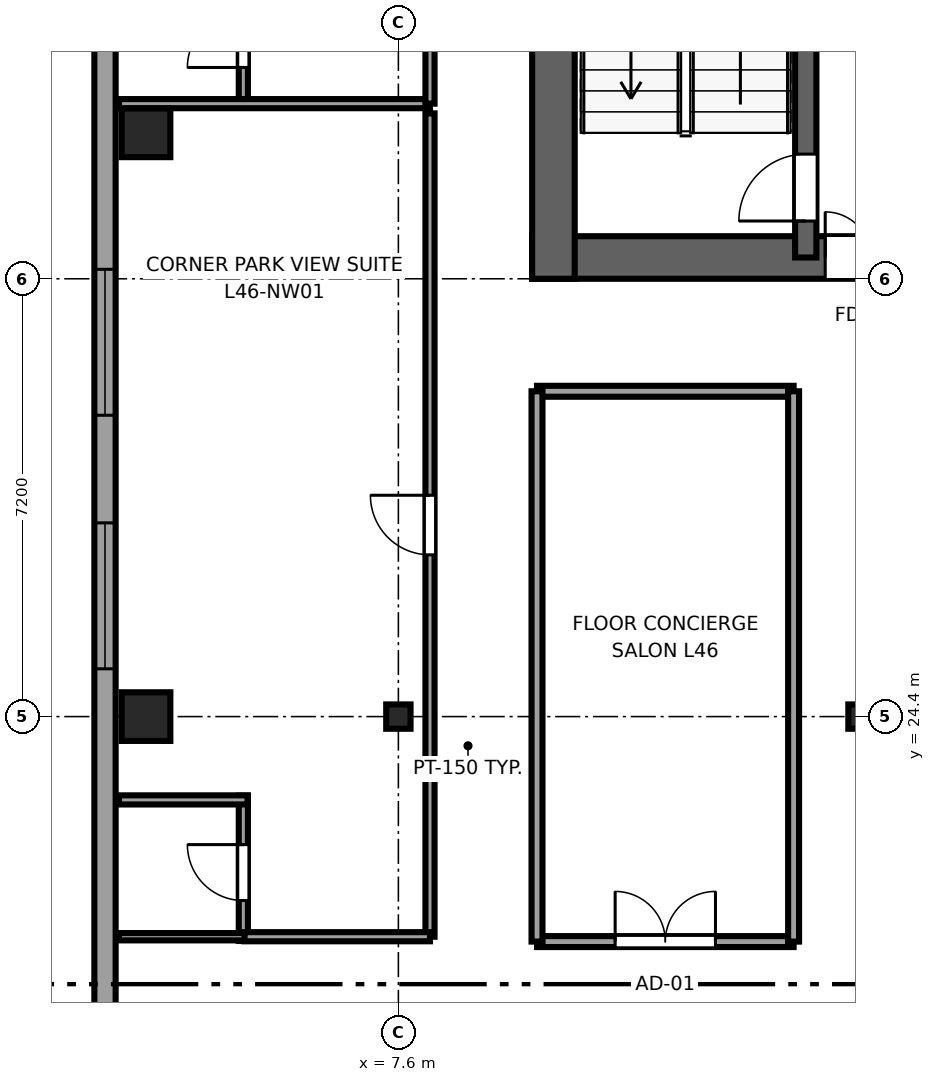
"""IFC4 building model, lengths in metres.
Left out: names, types, materials, properties, quantities, classifications, styles, units other than length and angle.
Written with IfcOpenShell. Run it as: python <this file> out.ifc"""

import sys

from ifc_helpers import new_model, si_unit, direction, frame, frame_2d, origin, origin_2d, place, context, subcontext, project, spatial, rectangle, i_section, extrude, source, transform, mapped, element, fill, save


model = new_model("IFC4")
c1 = context("Model", 3, precision=1e-05, world=origin(), true_north=direction((0.0, 1.0)))
c2 = subcontext(c1, "Body", "Model", "MODEL_VIEW")
j1 = project(units=[si_unit("LENGTHUNIT", "METRE"), si_unit("PLANEANGLEUNIT", "RADIAN")], contexts=[c1])
p1 = place(None, origin())
s1 = spatial("IfcSite", under=j1, at=p1, CompositionType="ELEMENT")
p2 = place(p1, origin())
s2 = spatial("IfcBuilding", under=s1, at=p2, CompositionType="ELEMENT")
p3 = place(p2, frame((0.0, 0.0, 175.45)))
s3 = spatial("IfcBuildingStorey", under=s2, at=p3, CompositionType="ELEMENT", Elevation=175.45)
p4 = place(p3, frame((9.8, 31.95, 0.0), z_axis=(0.0, 0.0, 1.0), x_axis=(1.0, 0.0, 0.0)))
e1 = element("IfcWall", 1, at=p4, inside=s3, PredefinedType="SHEAR", context=c2, shape_type="SweptSolid", body=[
    extrude(rectangle(XDim=26.4, YDim=0.7, at=frame_2d((13.2, 0.0))), origin(), (0.0, 0.0, 1.0), 3.55),
])
p5 = place(p4, frame((6.32, 0.0, 0.0), z_axis=(0.0, 0.0, 1.0), x_axis=(-1.0, 0.0, 0.0)))
e2 = element("IfcOpeningElement", 2, at=p5, cuts=e1, PredefinedType="OPENING", context=c2, shape_type="SweptSolid", body=[
    extrude(rectangle(XDim=1.5, YDim=2.04, at=frame_2d((0.75, 1.02))), frame((0.0, 0.36, 0.0), z_axis=(0.0, -1.0, 0.0), x_axis=(1.0, 0.0, 0.0)), (0.0, 0.0, 1.0), 0.72),
])
p6 = place(p4, frame((13.95, 0.0, 0.0), z_axis=(0.0, 0.0, 1.0), x_axis=(-1.0, 0.0, 0.0)))
e3 = element("IfcOpeningElement", 3, at=p6, cuts=e1, PredefinedType="OPENING", context=c2, shape_type="SweptSolid", body=[
    extrude(rectangle(XDim=1.5, YDim=2.04, at=frame_2d((0.75, 1.02))), frame((0.0, 0.36, 0.0), z_axis=(0.0, -1.0, 0.0), x_axis=(1.0, 0.0, 0.0)), (0.0, 0.0, 1.0), 0.72),
])
p7 = place(p4, frame((20.25, 0.0, 0.0), z_axis=(0.0, 0.0, 1.0), x_axis=(-1.0, 0.0, 0.0)))
e4 = element("IfcOpeningElement", 4, at=p7, cuts=e1, PredefinedType="OPENING", context=c2, shape_type="SweptSolid", body=[
    extrude(rectangle(XDim=1.5, YDim=2.04, at=frame_2d((0.75, 1.02))), frame((0.0, 0.36, 0.0), z_axis=(0.0, -1.0, 0.0), x_axis=(1.0, 0.0, 0.0)), (0.0, 0.0, 1.0), 0.72),
])
p8 = place(p4, frame((8.37, 0.0, 0.0), z_axis=(0.0, 0.0, 1.0), x_axis=(-1.0, 0.0, 0.0)))
e5 = element("IfcOpeningElement", 5, at=p8, cuts=e1, PredefinedType="OPENING", context=c2, shape_type="SweptSolid", body=[
    extrude(rectangle(XDim=0.82, YDim=2.01, at=frame_2d((0.41, 1.005))), frame((0.0, 0.36, 0.0), z_axis=(0.0, -1.0, 0.0), x_axis=(1.0, 0.0, 0.0)), (0.0, 0.0, 1.0), 0.72),
])
p9 = place(p3, frame((10.15, 31.6, 0.0), z_axis=(0.0, 0.0, 1.0), x_axis=(0.0, 1.0, 0.0)))
e6 = element("IfcWall", 6, at=p9, inside=s3, PredefinedType="SHEAR", context=c2, shape_type="SweptSolid", body=[
    extrude(rectangle(XDim=13.6, YDim=0.7, at=frame_2d((6.8, 0.0))), origin(), (0.0, 0.0, 1.0), 3.55),
])
p10 = place(p3, frame((14.3, 31.95, 0.0), z_axis=(0.0, 0.0, 1.0), x_axis=(0.0, 1.0, 0.0)))
e7 = element("IfcWall", 7, at=p10, inside=s3, PredefinedType="SHEAR", context=c2, shape_type="SweptSolid", body=[
    extrude(rectangle(XDim=12.9, YDim=0.35, at=frame_2d((6.45, 0.0))), origin(), (0.0, 0.0, 1.0), 3.55),
])
p11 = place(p10, frame((0.6, 0.0, 0.0)))
e8 = element("IfcOpeningElement", 8, at=p11, cuts=e7, PredefinedType="OPENING", context=c2, shape_type="SweptSolid", body=[
    extrude(rectangle(XDim=1.1, YDim=2.12, at=frame_2d((0.55, 1.06))), frame((0.0, 0.185, 0.0), z_axis=(0.0, -1.0, 0.0), x_axis=(1.0, 0.0, 0.0)), (0.0, 0.0, 1.0), 0.37),
])
m1 = source(origin(), c2, "Body", "SweptSolid", [
    extrude(rectangle(XDim=0.8, YDim=0.8, at=origin_2d()), origin(), (0.0, 0.0, 1.0), 3.55),
])
p12 = place(p3, frame((3.45, 24.4, 0.0), z_axis=(0.0, 0.0, 1.0), x_axis=(1.0, 0.0, 0.0)))
e9 = element("IfcColumn", 9, at=p12, inside=s3, PredefinedType="COLUMN", context=c2, shape_type="MappedRepresentation", body=[
    mapped(m1, transform((0.0, 0.0, 0.0), x_axis=(1.0, 0.0, 0.0), y_axis=(0.0, 1.0, 0.0), z_axis=(0.0, 0.0, 1.0), scale=1.0)),
])
m2 = source(origin(), c2, "Body", "SweptSolid", [
    extrude(i_section(OverallWidth=0.4, OverallDepth=0.4, WebThickness=0.02, FlangeThickness=0.035, at=origin_2d()), origin(), (0.0, 0.0, 1.0), 3.55),
])
for number, where, z_axis, x_axis in (
    (10, (7.6, 24.4, 0.0), (0.0, 0.0, 1.0), (1.0, 0.0, 0.0)),
    (11, (15.2, 24.4, 0.0), (0.0, 0.0, 1.0), (1.0, 0.0, 0.0)),
):
    element("IfcColumn", number, at=place(p3, frame(where, z_axis=z_axis, x_axis=x_axis)), inside=s3, PredefinedType="COLUMN", context=c2, shape_type="MappedRepresentation", body=[
        mapped(m2, transform((0.0, 0.0, 0.0), x_axis=(1.0, 0.0, 0.0), y_axis=(0.0, 1.0, 0.0), z_axis=(0.0, 0.0, 1.0), scale=1.0)),
    ])
p13 = place(p3, frame((3.45, 34.0, 0.0), z_axis=(0.0, 0.0, 1.0), x_axis=(1.0, 0.0, 0.0)))
e12 = element("IfcColumn", 12, at=p13, inside=s3, PredefinedType="COLUMN", context=c2, shape_type="MappedRepresentation", body=[
    mapped(m1, transform((0.0, 0.0, 0.0), x_axis=(1.0, 0.0, 0.0), y_axis=(0.0, 1.0, 0.0), z_axis=(0.0, 0.0, 1.0), scale=1.0)),
])
p14 = place(p3, frame((2.775, 41.583, 0.0), z_axis=(0.0, 0.0, 1.0), x_axis=(0.0, -1.0, 0.0)))
e13 = element("IfcWall", 13, at=p14, inside=s3, PredefinedType="SOLIDWALL", context=c2, shape_type="SweptSolid", body=[
    extrude(rectangle(XDim=34.566, YDim=0.35, at=frame_2d((17.283, 0.0))), origin(), (0.0, 0.0, 1.0), 3.37),
])
p15 = place(p14, frame((1.485, 0.0, 0.68)))
e14 = element("IfcOpeningElement", 14, at=p15, cuts=e13, PredefinedType="OPENING", context=c2, shape_type="SweptSolid", body=[
    extrude(rectangle(XDim=2.4, YDim=1.9, at=frame_2d((1.2, 0.95))), frame((0.0, 0.185, 0.0), z_axis=(0.0, -1.0, 0.0), x_axis=(1.0, 0.0, 0.0)), (0.0, 0.0, 1.0), 0.37),
])
p16 = place(p14, frame((9.827, 0.0, 0.68)))
e15 = element("IfcOpeningElement", 15, at=p16, cuts=e13, PredefinedType="OPENING", context=c2, shape_type="SweptSolid", body=[
    extrude(rectangle(XDim=2.4, YDim=1.9, at=frame_2d((1.2, 0.95))), frame((0.0, 0.185, 0.0), z_axis=(0.0, -1.0, 0.0), x_axis=(1.0, 0.0, 0.0)), (0.0, 0.0, 1.0), 0.37),
])
p17 = place(p14, frame((13.997, 0.0, 0.68)))
e16 = element("IfcOpeningElement", 16, at=p17, cuts=e13, PredefinedType="OPENING", context=c2, shape_type="SweptSolid", body=[
    extrude(rectangle(XDim=2.4, YDim=1.9, at=frame_2d((1.2, 0.95))), frame((0.0, 0.185, 0.0), z_axis=(0.0, -1.0, 0.0), x_axis=(1.0, 0.0, 0.0)), (0.0, 0.0, 1.0), 0.37),
])
p18 = place(p14, frame((30.13, 0.0, 0.68)))
e17 = element("IfcOpeningElement", 17, at=p18, cuts=e13, PredefinedType="OPENING", context=c2, shape_type="SweptSolid", body=[
    extrude(rectangle(XDim=2.4, YDim=1.9, at=frame_2d((1.2, 0.95))), frame((0.0, 0.185, 0.0), z_axis=(0.0, -1.0, 0.0), x_axis=(1.0, 0.0, 0.0)), (0.0, 0.0, 1.0), 0.37),
])
p19 = place(p14, frame((24.983, 0.0, 0.62)))
e18 = element("IfcOpeningElement", 18, at=p19, cuts=e13, PredefinedType="OPENING", context=c2, shape_type="SweptSolid", body=[
    extrude(rectangle(XDim=1.5, YDim=1.55, at=frame_2d((0.75, 0.775))), frame((0.0, 0.185, 0.0), z_axis=(0.0, -1.0, 0.0), x_axis=(1.0, 0.0, 0.0)), (0.0, 0.0, 1.0), 0.37),
])
p20 = place(p3, frame((5.05, 20.71, 0.0), z_axis=(0.0, 0.0, 1.0), x_axis=(0.0, 1.0, 0.0)))
e19 = element("IfcWall", 19, at=p20, inside=s3, PredefinedType="PARTITIONING", context=c2, shape_type="SweptSolid", body=[
    extrude(rectangle(XDim=2.39, YDim=0.15, at=frame_2d((1.195, 0.0))), origin(), (0.0, 0.0, 1.0), 3.37),
])
p21 = place(p20, frame((0.665, 0.0, 0.0)))
e20 = element("IfcOpeningElement", 20, at=p21, cuts=e19, PredefinedType="OPENING", context=c2, shape_type="SweptSolid", body=[
    extrude(rectangle(XDim=0.92, YDim=2.01, at=frame_2d((0.46, 1.005))), frame((0.0, 0.085, 0.0), z_axis=(0.0, -1.0, 0.0), x_axis=(1.0, 0.0, 0.0)), (0.0, 0.0, 1.0), 0.17),
])
p22 = place(p3, frame((3.005, 20.78, 0.0), z_axis=(0.0, 0.0, 1.0), x_axis=(1.0, 0.0, 0.0)))
e21 = element("IfcWall", 21, at=p22, inside=s3, PredefinedType="PLUMBINGWALL", context=c2, shape_type="SweptSolid", body=[
    extrude(rectangle(XDim=2.115, YDim=0.12, at=frame_2d((1.058, 0.0))), origin(), (0.0, 0.0, 1.0), 3.37),
])
p23 = place(p3, frame((3.005, 23.03, 0.0), z_axis=(0.0, 0.0, 1.0), x_axis=(1.0, 0.0, 0.0)))
e22 = element("IfcWall", 22, at=p23, inside=s3, PredefinedType="PARTITIONING", context=c2, shape_type="SweptSolid", body=[
    extrude(rectangle(XDim=2.115, YDim=0.15, at=frame_2d((1.058, 0.0))), origin(), (0.0, 0.0, 1.0), 3.37),
])
p24 = place(p3, frame((5.05, 34.41, 0.0), z_axis=(0.0, 0.0, 1.0), x_axis=(0.0, 1.0, 0.0)))
e23 = element("IfcWall", 23, at=p24, inside=s3, PredefinedType="PARTITIONING", context=c2, shape_type="SweptSolid", body=[
    extrude(rectangle(XDim=2.39, YDim=0.15, at=frame_2d((1.195, 0.0))), origin(), (0.0, 0.0, 1.0), 3.37),
])
p25 = place(p24, frame((0.665, 0.0, 0.0)))
e24 = element("IfcOpeningElement", 24, at=p25, cuts=e23, PredefinedType="OPENING", context=c2, shape_type="SweptSolid", body=[
    extrude(rectangle(XDim=0.92, YDim=2.01, at=frame_2d((0.46, 1.005))), frame((0.0, 0.085, 0.0), z_axis=(0.0, -1.0, 0.0), x_axis=(1.0, 0.0, 0.0)), (0.0, 0.0, 1.0), 0.17),
])
p26 = place(p3, frame((3.005, 34.48, 0.0), z_axis=(0.0, 0.0, 1.0), x_axis=(1.0, 0.0, 0.0)))
e25 = element("IfcWall", 25, at=p26, inside=s3, PredefinedType="PARTITIONING", context=c2, shape_type="SweptSolid", body=[
    extrude(rectangle(XDim=5.115, YDim=0.15, at=frame_2d((2.558, 0.0))), origin(), (0.0, 0.0, 1.0), 3.37),
])
p27 = place(p3, frame((8.12, 20.78, 0.0), z_axis=(0.0, 0.0, 1.0), x_axis=(0.0, 1.0, 0.0)))
e26 = element("IfcWall", 26, at=p27, inside=s3, PredefinedType="PARTITIONING", context=c2, shape_type="SweptSolid", body=[
    extrude(rectangle(XDim=13.54, YDim=0.15, at=frame_2d((6.77, 0.0))), origin(), (0.0, 0.0, 1.0), 3.37),
])
p28 = place(p27, frame((6.28, 0.0, 0.0)))
e27 = element("IfcOpeningElement", 27, at=p28, cuts=e26, PredefinedType="OPENING", context=c2, shape_type="SweptSolid", body=[
    extrude(rectangle(XDim=0.98, YDim=2.12, at=frame_2d((0.49, 1.06))), frame((0.0, 0.085, 0.0), z_axis=(0.0, -1.0, 0.0), x_axis=(1.0, 0.0, 0.0)), (0.0, 0.0, 1.0), 0.17),
])
p29 = place(p3, frame((5.07, 20.78, 0.0), z_axis=(0.0, 0.0, 1.0), x_axis=(1.0, 0.0, 0.0)))
e28 = element("IfcWall", 28, at=p29, inside=s3, PredefinedType="PARTITIONING", context=c2, shape_type="SweptSolid", body=[
    extrude(rectangle(XDim=3.05, YDim=0.15, at=frame_2d((1.525, 0.0))), origin(), (0.0, 0.0, 1.0), 3.37),
])
p30 = place(p3, frame((8.12, 34.48, 0.0), z_axis=(0.0, 0.0, 1.0), x_axis=(0.0, 1.0, 0.0)))
e29 = element("IfcWall", 29, at=p30, inside=s3, PredefinedType="PARTITIONING", context=c2, shape_type="SweptSolid", body=[
    extrude(rectangle(XDim=11.115, YDim=0.15, at=frame_2d((5.558, 0.0))), origin(), (0.0, 0.0, 1.0), 3.37),
])
p31 = place(p30, frame((4.32, 0.0, 0.0)))
e30 = element("IfcOpeningElement", 30, at=p31, cuts=e29, PredefinedType="OPENING", context=c2, shape_type="SweptSolid", body=[
    extrude(rectangle(XDim=0.98, YDim=2.12, at=frame_2d((0.49, 1.06))), frame((0.0, 0.085, 0.0), z_axis=(0.0, -1.0, 0.0), x_axis=(1.0, 0.0, 0.0)), (0.0, 0.0, 1.0), 0.17),
])
p32 = place(p3, frame((9.88, 20.7, 0.0), z_axis=(0.0, 0.0, 1.0), x_axis=(1.0, 0.0, 0.0)))
e31 = element("IfcWall", 31, at=p32, inside=s3, PredefinedType="PARTITIONING", context=c2, shape_type="SweptSolid", body=[
    extrude(rectangle(XDim=4.22, YDim=0.18, at=frame_2d((2.11, 0.0))), origin(), (0.0, 0.0, 1.0), 3.37),
])
p33 = place(p32, frame((1.285, 0.0, 0.0)))
e32 = element("IfcOpeningElement", 32, at=p33, cuts=e31, PredefinedType="OPENING", context=c2, shape_type="SweptSolid", body=[
    extrude(rectangle(XDim=1.65, YDim=2.15, at=frame_2d((0.825, 1.075))), frame((0.0, 0.1, 0.0), z_axis=(0.0, -1.0, 0.0), x_axis=(1.0, 0.0, 0.0)), (0.0, 0.0, 1.0), 0.2),
])
p34 = place(p3, frame((9.88, 29.75, 0.0), z_axis=(0.0, 0.0, 1.0), x_axis=(1.0, 0.0, 0.0)))
e33 = element("IfcWall", 33, at=p34, inside=s3, PredefinedType="PARTITIONING", context=c2, shape_type="SweptSolid", body=[
    extrude(rectangle(XDim=4.22, YDim=0.18, at=frame_2d((2.11, 0.0))), origin(), (0.0, 0.0, 1.0), 3.37),
])
for number, where, z_axis, x_axis in (
    (34, (9.88, 20.7, 0.0), (0.0, 0.0, 1.0), (0.0, 1.0, 0.0)),
    (35, (14.1, 20.7, 0.0), (0.0, 0.0, 1.0), (0.0, 1.0, 0.0)),
):
    element("IfcWall", number, at=place(p3, frame(where, z_axis=z_axis, x_axis=x_axis)), inside=s3, PredefinedType="PARTITIONING", context=c2, shape_type="SweptSolid", body=[
        extrude(rectangle(XDim=9.05, YDim=0.18, at=frame_2d((4.525, 0.0))), origin(), (0.0, 0.0, 1.0), 3.37),
    ])
m3 = source(origin(), c2, "Body", "SweptSolid", [
    extrude(rectangle(XDim=2.4, YDim=1.9, at=frame_2d((1.2, 0.95))), frame((0.0, 0.09, 0.0), z_axis=(0.0, -1.0, 0.0), x_axis=(1.0, 0.0, 0.0)), (0.0, 0.0, 1.0), 0.06),
])
p35 = place(p16, origin())
e36 = element("IfcWindow", 36, at=p35, inside=s3, PartitioningType="TRIPLE_PANEL_HORIZONTAL", PredefinedType="WINDOW", context=c2, shape_type="MappedRepresentation", body=[
    mapped(m3, transform((0.0, 0.0, 0.0), x_axis=(1.0, 0.0, 0.0), y_axis=(0.0, 1.0, 0.0), z_axis=(0.0, 0.0, 1.0), scale=1.0)),
])
fill(e15, e36)
p36 = place(p17, origin())
e37 = element("IfcWindow", 37, at=p36, inside=s3, PartitioningType="TRIPLE_PANEL_HORIZONTAL", PredefinedType="WINDOW", context=c2, shape_type="MappedRepresentation", body=[
    mapped(m3, transform((0.0, 0.0, 0.0), x_axis=(1.0, 0.0, 0.0), y_axis=(0.0, 1.0, 0.0), z_axis=(0.0, 0.0, 1.0), scale=1.0)),
])
fill(e16, e37)
m4 = source(origin(), c2, "Body", "SweptSolid", [
    extrude(rectangle(XDim=1.1, YDim=2.12, at=frame_2d((0.55, 1.06))), frame((0.0, 0.025, 0.0), z_axis=(0.0, -1.0, 0.0), x_axis=(1.0, 0.0, 0.0)), (0.0, 0.0, 1.0), 0.05),
])
p37 = place(p11, origin())
e38 = element("IfcDoor", 38, at=p37, inside=s3, OperationType="SINGLE_SWING_LEFT", PredefinedType="DOOR", context=c2, shape_type="MappedRepresentation", body=[
    mapped(m4, transform((0.0, 0.0, 0.0), x_axis=(1.0, 0.0, 0.0), y_axis=(0.0, 1.0, 0.0), z_axis=(0.0, 0.0, 1.0), scale=1.0)),
])
fill(e8, e38)
m5 = source(origin(), c2, "Body", "SweptSolid", [
    extrude(rectangle(XDim=1.5, YDim=2.04, at=frame_2d((0.75, 1.02))), frame((0.0, 0.025, 0.0), z_axis=(0.0, -1.0, 0.0), x_axis=(1.0, 0.0, 0.0)), (0.0, 0.0, 1.0), 0.05),
])
p38 = place(p5, origin())
e39 = element("IfcDoor", 39, at=p38, inside=s3, OperationType="DOUBLE_DOOR_SINGLE_SWING", PredefinedType="DOOR", context=c2, shape_type="MappedRepresentation", body=[
    mapped(m5, transform((0.0, 0.0, 0.0), x_axis=(1.0, 0.0, 0.0), y_axis=(0.0, 1.0, 0.0), z_axis=(0.0, 0.0, 1.0), scale=1.0)),
])
fill(e2, e39)
m6 = source(origin(), c2, "Body", "SweptSolid", [
    extrude(rectangle(XDim=0.92, YDim=2.01, at=frame_2d((0.46, 1.005))), frame((0.0, 0.025, 0.0), z_axis=(0.0, -1.0, 0.0), x_axis=(1.0, 0.0, 0.0)), (0.0, 0.0, 1.0), 0.05),
])
p39 = place(p21, origin())
e40 = element("IfcDoor", 40, at=p39, inside=s3, OperationType="SINGLE_SWING_RIGHT", PredefinedType="DOOR", context=c2, shape_type="MappedRepresentation", body=[
    mapped(m6, transform((0.0, 0.0, 0.0), x_axis=(1.0, 0.0, 0.0), y_axis=(0.0, 1.0, 0.0), z_axis=(0.0, 0.0, 1.0), scale=1.0)),
])
fill(e20, e40)
p40 = place(p25, origin())
e41 = element("IfcDoor", 41, at=p40, inside=s3, OperationType="SINGLE_SWING_LEFT", PredefinedType="DOOR", context=c2, shape_type="MappedRepresentation", body=[
    mapped(m6, transform((0.0, 0.0, 0.0), x_axis=(1.0, 0.0, 0.0), y_axis=(0.0, 1.0, 0.0), z_axis=(0.0, 0.0, 1.0), scale=1.0)),
])
fill(e24, e41)
m7 = source(origin(), c2, "Body", "SweptSolid", [
    extrude(rectangle(XDim=0.98, YDim=2.12, at=frame_2d((0.49, 1.06))), frame((0.0, 0.025, 0.0), z_axis=(0.0, -1.0, 0.0), x_axis=(1.0, 0.0, 0.0)), (0.0, 0.0, 1.0), 0.05),
])
p41 = place(p28, origin())
e42 = element("IfcDoor", 42, at=p41, inside=s3, OperationType="SINGLE_SWING_RIGHT", PredefinedType="DOOR", context=c2, shape_type="MappedRepresentation", body=[
    mapped(m7, transform((0.0, 0.0, 0.0), x_axis=(1.0, 0.0, 0.0), y_axis=(0.0, 1.0, 0.0), z_axis=(0.0, 0.0, 1.0), scale=1.0)),
])
fill(e27, e42)
m8 = source(origin(), c2, "Body", "SweptSolid", [
    extrude(rectangle(XDim=1.65, YDim=2.15, at=frame_2d((0.825, 1.075))), frame((0.0, 0.025, 0.0), z_axis=(0.0, -1.0, 0.0), x_axis=(1.0, 0.0, 0.0)), (0.0, 0.0, 1.0), 0.05),
])
p42 = place(p33, origin())
e43 = element("IfcDoor", 43, at=p42, inside=s3, OperationType="DOUBLE_DOOR_SINGLE_SWING", PredefinedType="DOOR", context=c2, shape_type="MappedRepresentation", body=[
    mapped(m8, transform((0.0, 0.0, 0.0), x_axis=(1.0, 0.0, 0.0), y_axis=(0.0, 1.0, 0.0), z_axis=(0.0, 0.0, 1.0), scale=1.0)),
])
fill(e32, e43)
save(model, sys.argv[1])
